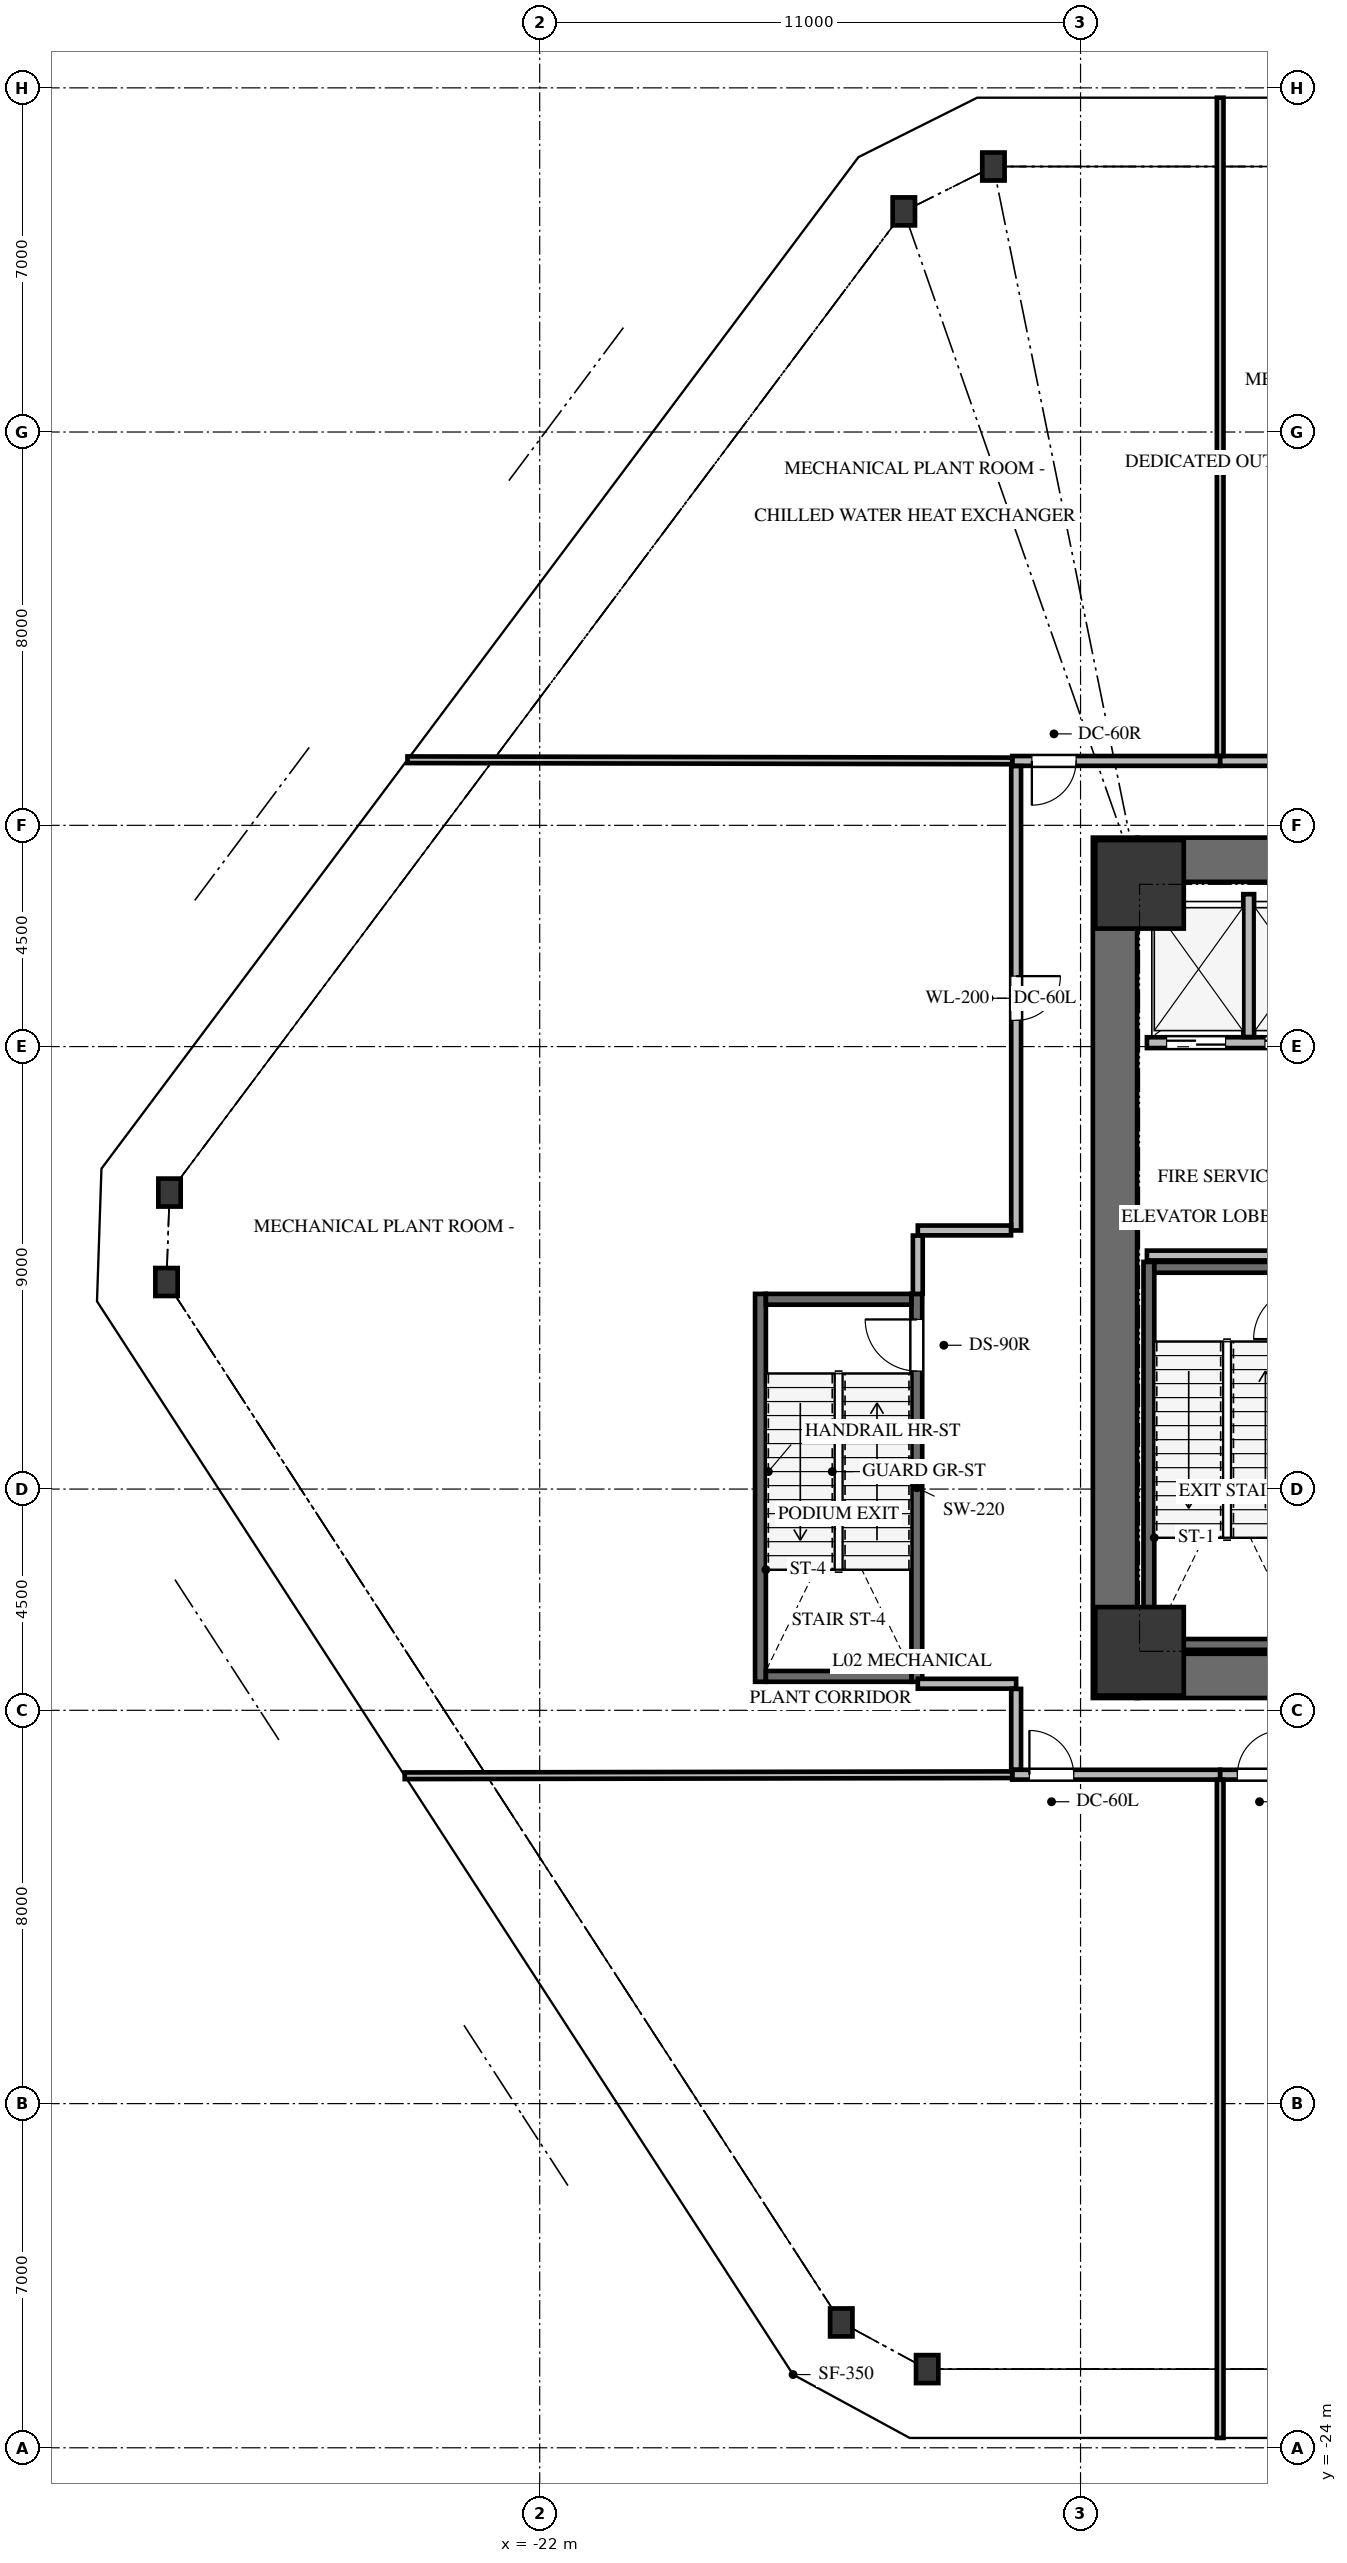
"""IFC4 building model, lengths in metres.
Left out: names, types, materials, properties, quantities, classifications, styles, units other than length and angle.
Written with IfcOpenShell. Run it as: python <this file> out.ifc"""

import sys

from ifc_helpers import new_model, si_unit, direction, frame, frame_2d, origin, origin_2d, place, context, subcontext, project, spatial, rectangle, i_section, extrude, source, transform, mapped, element, fill, save


model = new_model("IFC4")
c1 = context("Model", 3, precision=1e-05, world=origin(), true_north=direction((0.0, 1.0)))
c2 = subcontext(c1, "Body", "Model", "MODEL_VIEW")
j1 = project(units=[si_unit("LENGTHUNIT", "METRE"), si_unit("PLANEANGLEUNIT", "RADIAN")], contexts=[c1])
p1 = place(None, origin())
s1 = spatial("IfcSite", under=j1, at=p1, CompositionType="ELEMENT")
p2 = place(p1, origin())
s2 = spatial("IfcBuilding", under=s1, at=p2, CompositionType="ELEMENT")
p3 = place(p2, frame((0.0, 0.0, 10.4)))
s3 = spatial("IfcBuildingStorey", under=s2, at=p3, CompositionType="ELEMENT", Elevation=10.4)
p4 = place(p3, frame((-10.3, -8.75, 0.0), z_axis=(0.0, 0.0, 1.0), x_axis=(0.0, 1.0, 0.0)))
e1 = element("IfcWall", 1, at=p4, inside=s3, PredefinedType="SHEAR", context=c2, shape_type="SweptSolid", body=[
    extrude(rectangle(XDim=17.5, YDim=0.9, at=frame_2d((8.75, 0.0))), origin(), (0.0, 0.0, 1.0), 5.2),
])
p5 = place(p3, frame((-9.85, -8.3, 0.0), z_axis=(0.0, 0.0, 1.0), x_axis=(1.0, 0.0, 0.0)))
e2 = element("IfcWall", 2, at=p5, inside=s3, PredefinedType="SHEAR", context=c2, shape_type="SweptSolid", body=[
    extrude(rectangle(XDim=7.75, YDim=0.9, at=frame_2d((3.875, 0.0))), origin(), (0.0, 0.0, 1.0), 5.2),
])
p6 = place(p3, frame((-9.85, 8.3, 0.0), z_axis=(0.0, 0.0, 1.0), x_axis=(1.0, 0.0, 0.0)))
e3 = element("IfcWall", 3, at=p6, inside=s3, PredefinedType="SHEAR", context=c2, shape_type="SweptSolid", body=[
    extrude(rectangle(XDim=19.7, YDim=0.9, at=frame_2d((9.85, 0.0))), origin(), (0.0, 0.0, 1.0), 5.2),
])
p7 = place(p3, frame((-9.61, 0.12, -0.35), z_axis=(0.0, 0.0, 1.0), x_axis=(0.0, -1.0, 0.0)))
e4 = element("IfcWall", 4, at=p7, inside=s3, PredefinedType="SHEAR", context=c2, shape_type="SweptSolid", body=[
    extrude(rectangle(XDim=7.89, YDim=0.22, at=frame_2d((3.945, 0.0))), origin(), (0.0, 0.0, 1.0), 5.23),
])
for number, where, z_axis, x_axis in (
    (5, (-9.5, -7.66, -0.35), (0.0, 0.0, 1.0), (1.0, 0.0, 0.0)),
    (6, (-6.54, 0.01, -0.35), (0.0, 0.0, 1.0), (-1.0, 0.0, 0.0)),
):
    element("IfcWall", number, at=place(p3, frame(where, z_axis=z_axis, x_axis=x_axis)), inside=s3, PredefinedType="SHEAR", context=c2, shape_type="SweptSolid", body=[
        extrude(rectangle(XDim=2.96, YDim=0.22, at=frame_2d((1.48, 0.0))), origin(), (0.0, 0.0, 1.0), 5.23),
    ])
p8 = place(p3, frame((-14.33, -8.42, -0.35), z_axis=(0.0, 0.0, 1.0), x_axis=(0.0, 1.0, 0.0)))
e7 = element("IfcWall", 7, at=p8, inside=s3, PredefinedType="SHEAR", context=c2, shape_type="SweptSolid", body=[
    extrude(rectangle(XDim=7.89, YDim=0.22, at=frame_2d((3.945, 0.0))), origin(), (0.0, 0.0, 1.0), 5.23),
])
p9 = place(p8, frame((6.32, 0.0, 0.0)))
e8 = element("IfcOpeningElement", 8, at=p9, cuts=e7, PredefinedType="OPENING", context=c2, shape_type="SweptSolid", body=[
    extrude(rectangle(XDim=1.05, YDim=2.15, at=frame_2d((0.525, 1.075))), frame((0.0, 0.12, 0.0), z_axis=(0.0, -1.0, 0.0), x_axis=(1.0, 0.0, 0.0)), (0.0, 0.0, 1.0), 0.24),
])
p10 = place(p3, frame((-17.51, -0.53, -0.35), z_axis=(0.0, 0.0, 1.0), x_axis=(0.0, -1.0, 0.0)))
e9 = element("IfcWall", 9, at=p10, inside=s3, PredefinedType="SHEAR", context=c2, shape_type="SweptSolid", body=[
    extrude(rectangle(XDim=7.89, YDim=0.22, at=frame_2d((3.945, 0.0))), origin(), (0.0, 0.0, 1.0), 5.23),
])
for number, where, z_axis, x_axis in (
    (10, (-17.4, -8.31, -0.35), (0.0, 0.0, 1.0), (1.0, 0.0, 0.0)),
    (11, (-14.44, -0.64, -0.35), (0.0, 0.0, 1.0), (-1.0, 0.0, 0.0)),
):
    element("IfcWall", number, at=place(p3, frame(where, z_axis=z_axis, x_axis=x_axis)), inside=s3, PredefinedType="SHEAR", context=c2, shape_type="SweptSolid", body=[
        extrude(rectangle(XDim=2.96, YDim=0.22, at=frame_2d((1.48, 0.0))), origin(), (0.0, 0.0, 1.0), 5.23),
    ])
m1 = source(origin(), c2, "Body", "SweptSolid", [
    extrude(rectangle(XDim=1.8, YDim=1.8, at=origin_2d()), origin(), (0.0, 0.0, 1.0), 5.23),
])
for number, where, z_axis, x_axis in (
    (12, (-9.8, -7.8, -0.35), (0.0, 0.0, 1.0), (1.0, 0.0, 0.0)),
    (13, (-9.8, 7.8, -0.35), (0.0, 0.0, 1.0), (1.0, 0.0, 0.0)),
):
    element("IfcColumn", number, at=place(p3, frame(where, z_axis=z_axis, x_axis=x_axis)), inside=s3, PredefinedType="COLUMN", context=c2, shape_type="MappedRepresentation", body=[
        mapped(m1, transform((0.0, 0.0, 0.0), x_axis=(1.0, 0.0, 0.0), y_axis=(0.0, 1.0, 0.0), z_axis=(0.0, 0.0, 1.0), scale=1.0)),
    ])
m2 = source(origin(), c2, "Body", "SweptSolid", [
    extrude(i_section(OverallWidth=0.454, OverallDepth=0.569, WebThickness=0.078, FlangeThickness=0.125, FilletRadius=0.031, at=origin_2d()), origin(), (0.0, 0.0, 1.0), 5.23),
])
for number, where, z_axis, x_axis in (
    (14, (-15.866, -21.451, -0.35), (0.0, 0.0, 1.0), (1.0, 0.0, 0.0)),
    (15, (-29.591, -0.289, -0.35), (0.0, 0.0, 1.0), (1.0, 0.0, 0.0)),
    (16, (-29.529, 1.531, -0.35), (0.0, 0.0, 1.0), (1.0, 0.0, 0.0)),
    (17, (-14.594, 21.488, -0.35), (0.0, 0.0, 1.0), (1.0, 0.0, 0.0)),
    (18, (-12.772, 22.4, -0.35), (0.0, 0.0, 1.0), (1.0, 0.0, 0.0)),
    (19, (-14.119, -22.4, -0.35), (0.0, 0.0, 1.0), (1.0, 0.0, 0.0)),
):
    element("IfcColumn", number, at=place(p3, frame(where, z_axis=z_axis, x_axis=x_axis)), inside=s3, PredefinedType="COLUMN", context=c2, shape_type="MappedRepresentation", body=[
        mapped(m2, transform((0.0, 0.0, 0.0), x_axis=(1.0, 0.0, 0.0), y_axis=(0.0, 1.0, 0.0), z_axis=(0.0, 0.0, 1.0), scale=1.0)),
    ])
p11 = place(p3, frame((-9.65, 4.58, 0.0), z_axis=(0.0, 0.0, 1.0), x_axis=(1.0, 0.0, 0.0)))
e20 = element("IfcWall", 20, at=p11, inside=s3, PredefinedType="SOLIDWALL", context=c2, shape_type="SweptSolid", body=[
    extrude(rectangle(XDim=4.175, YDim=0.22, at=frame_2d((2.087, 0.0))), origin(), (0.0, 0.0, 1.0), 4.865),
])
p12 = place(p11, frame((0.4, 0.0, 0.0)))
e21 = element("IfcOpeningElement", 21, at=p12, cuts=e20, PredefinedType="OPENING", context=c2, shape_type="SweptSolid", body=[
    extrude(rectangle(XDim=1.2, YDim=2.15, at=frame_2d((0.6, 1.075))), frame((0.0, 0.12, 0.0), z_axis=(0.0, -1.0, 0.0), x_axis=(1.0, 0.0, 0.0)), (0.0, 0.0, 1.0), 0.24),
])
p13 = place(p11, frame((2.4, 0.0, 0.0)))
e22 = element("IfcOpeningElement", 22, at=p13, cuts=e20, PredefinedType="OPENING", context=c2, shape_type="SweptSolid", body=[
    extrude(rectangle(XDim=1.2, YDim=2.15, at=frame_2d((0.6, 1.075))), frame((0.0, 0.12, 0.0), z_axis=(0.0, -1.0, 0.0), x_axis=(1.0, 0.0, 0.0)), (0.0, 0.0, 1.0), 0.24),
])
p14 = place(p3, frame((-7.58, 4.694, 0.0), z_axis=(0.0, 0.0, 1.0), x_axis=(0.0, 1.0, 0.0)))
e23 = element("IfcWall", 23, at=p14, inside=s3, PredefinedType="SOLIDWALL", context=c2, shape_type="SweptSolid", body=[
    extrude(rectangle(XDim=2.906, YDim=0.22, at=frame_2d((1.453, 0.0))), origin(), (0.0, 0.0, 1.0), 4.865),
])
p15 = place(p3, frame((-9.65, 0.25, 0.0), z_axis=(0.0, 0.0, 1.0), x_axis=(1.0, 0.0, 0.0)))
e24 = element("IfcWall", 24, at=p15, inside=s3, PredefinedType="SOLIDWALL", context=c2, shape_type="SweptSolid", body=[
    extrude(rectangle(XDim=4.27, YDim=0.2, at=frame_2d((2.135, 0.0))), origin(), (0.0, 0.0, 1.0), 4.865),
])
p16 = place(p3, frame((-8.16, 10.31, 0.0), z_axis=(0.0, 0.0, 1.0), x_axis=(-1.0, 0.0, 0.0)))
e25 = element("IfcWall", 25, at=p16, inside=s3, PredefinedType="SOLIDWALL", context=c2, shape_type="SweptSolid", body=[
    extrude(rectangle(XDim=4.23, YDim=0.2, at=frame_2d((2.115, 0.0))), origin(), (0.0, 0.0, 1.0), 3.787),
])
p17 = place(p16, frame((2.93, 0.0, 0.0)))
e26 = element("IfcOpeningElement", 26, at=p17, cuts=e25, PredefinedType="OPENING", context=c2, shape_type="SweptSolid", body=[
    extrude(rectangle(XDim=0.9, YDim=2.05, at=frame_2d((0.45, 1.025))), frame((0.0, 0.11, 0.0), z_axis=(0.0, -1.0, 0.0), x_axis=(1.0, 0.0, 0.0)), (0.0, 0.0, 1.0), 0.22),
])
p18 = place(p3, frame((-2.66, 10.31, 0.0), z_axis=(0.0, 0.0, 1.0), x_axis=(-1.0, 0.0, 0.0)))
e27 = element("IfcWall", 27, at=p18, inside=s3, PredefinedType="SOLIDWALL", context=c2, shape_type="SweptSolid", body=[
    extrude(rectangle(XDim=5.5, YDim=0.2, at=frame_2d((2.75, 0.0))), origin(), (0.0, 0.0, 1.0), 4.418),
])
p19 = place(p18, frame((2.3, 0.0, 0.0)))
e28 = element("IfcOpeningElement", 28, at=p19, cuts=e27, PredefinedType="OPENING", context=c2, shape_type="SweptSolid", body=[
    extrude(rectangle(XDim=0.9, YDim=2.05, at=frame_2d((0.45, 1.025))), frame((0.0, 0.11, 0.0), z_axis=(0.0, -1.0, 0.0), x_axis=(1.0, 0.0, 0.0)), (0.0, 0.0, 1.0), 0.22),
])
p20 = place(p3, frame((-12.39, -10.31, 0.0), z_axis=(0.0, 0.0, 1.0), x_axis=(1.0, 0.0, 0.0)))
e29 = element("IfcWall", 29, at=p20, inside=s3, PredefinedType="SOLIDWALL", context=c2, shape_type="SweptSolid", body=[
    extrude(rectangle(XDim=4.23, YDim=0.2, at=frame_2d((2.115, 0.0))), origin(), (0.0, 0.0, 1.0), 3.787),
])
p21 = place(p20, frame((0.35, 0.0, 0.0)))
e30 = element("IfcOpeningElement", 30, at=p21, cuts=e29, PredefinedType="OPENING", context=c2, shape_type="SweptSolid", body=[
    extrude(rectangle(XDim=0.9, YDim=2.05, at=frame_2d((0.45, 1.025))), frame((0.0, 0.11, 0.0), z_axis=(0.0, -1.0, 0.0), x_axis=(1.0, 0.0, 0.0)), (0.0, 0.0, 1.0), 0.22),
])
p22 = place(p3, frame((-8.16, -10.31, 0.0), z_axis=(0.0, 0.0, 1.0), x_axis=(1.0, 0.0, 0.0)))
e31 = element("IfcWall", 31, at=p22, inside=s3, PredefinedType="SOLIDWALL", context=c2, shape_type="SweptSolid", body=[
    extrude(rectangle(XDim=5.5, YDim=0.2, at=frame_2d((2.75, 0.0))), origin(), (0.0, 0.0, 1.0), 3.787),
])
p23 = place(p22, frame((0.35, 0.0, 0.0)))
e32 = element("IfcOpeningElement", 32, at=p23, cuts=e31, PredefinedType="OPENING", context=c2, shape_type="SweptSolid", body=[
    extrude(rectangle(XDim=0.9, YDim=2.05, at=frame_2d((0.45, 1.025))), frame((0.0, 0.11, 0.0), z_axis=(0.0, -1.0, 0.0), x_axis=(1.0, 0.0, 0.0)), (0.0, 0.0, 1.0), 0.22),
])
p24 = place(p3, frame((-12.31, 10.206, 0.0), z_axis=(0.0, 0.0, 1.0), x_axis=(0.0, -1.0, 0.0)))
e33 = element("IfcWall", 33, at=p24, inside=s3, PredefinedType="SOLIDWALL", context=c2, shape_type="SweptSolid", body=[
    extrude(rectangle(XDim=9.446, YDim=0.2, at=frame_2d((4.723, 0.0))), origin(), (0.0, 0.0, 1.0), 3.787),
])
p25 = place(p24, frame((4.273, 0.0, 0.0)))
e34 = element("IfcOpeningElement", 34, at=p25, cuts=e33, PredefinedType="OPENING", context=c2, shape_type="SweptSolid", body=[
    extrude(rectangle(XDim=0.9, YDim=2.05, at=frame_2d((0.45, 1.025))), frame((0.0, 0.11, 0.0), z_axis=(0.0, -1.0, 0.0), x_axis=(1.0, 0.0, 0.0)), (0.0, 0.0, 1.0), 0.22),
])
p26 = place(p3, frame((-12.414, 0.76, 0.0), z_axis=(0.0, 0.0, 1.0), x_axis=(-1.0, 0.0, 0.0)))
e35 = element("IfcWall", 35, at=p26, inside=s3, PredefinedType="SOLIDWALL", context=c2, shape_type="SweptSolid", body=[
    extrude(rectangle(XDim=1.896, YDim=0.2, at=frame_2d((0.948, 0.0))), origin(), (0.0, 0.0, 1.0), 4.865),
])
p27 = place(p3, frame((-14.31, -8.46, 0.0), z_axis=(0.0, 0.0, 1.0), x_axis=(1.0, 0.0, 0.0)))
e36 = element("IfcWall", 36, at=p27, inside=s3, PredefinedType="SOLIDWALL", context=c2, shape_type="SweptSolid", body=[
    extrude(rectangle(XDim=2.0, YDim=0.2, at=frame_2d((1.0, 0.0))), origin(), (0.0, 0.0, 1.0), 4.865),
])
p28 = place(p3, frame((-12.31, -8.564, 0.0), z_axis=(0.0, 0.0, 1.0), x_axis=(0.0, -1.0, 0.0)))
e37 = element("IfcWall", 37, at=p28, inside=s3, PredefinedType="SOLIDWALL", context=c2, shape_type="SweptSolid", body=[
    extrude(rectangle(XDim=1.642, YDim=0.2, at=frame_2d((0.821, 0.0))), origin(), (0.0, 0.0, 1.0), 3.787),
])
p29 = place(p3, frame((-14.31, 0.656, 0.0), z_axis=(0.0, 0.0, 1.0), x_axis=(0.0, -1.0, 0.0)))
e38 = element("IfcWall", 38, at=p29, inside=s3, PredefinedType="SOLIDWALL", context=c2, shape_type="SweptSolid", body=[
    extrude(rectangle(XDim=1.186, YDim=0.2, at=frame_2d((0.593, 0.0))), origin(), (0.0, 0.0, 1.0), 4.865),
])
p30 = place(p3, frame((-8.16, 23.8, 0.0), z_axis=(0.0, 0.0, 1.0), x_axis=(0.0, -1.0, 0.0)))
e39 = element("IfcWall", 39, at=p30, inside=s3, PredefinedType="PARTITIONING", context=c2, shape_type="SweptSolid", body=[
    extrude(rectangle(XDim=13.386, YDim=0.135, at=frame_2d((6.693, 0.0))), origin(), (0.0, 0.0, 1.0), 4.174),
])
p31 = place(p3, frame((-12.39, 10.31, 0.0), z_axis=(0.0, 0.0, 1.0), x_axis=(-0.999998146559, 0.001925325425, 0.0)))
e40 = element("IfcWall", 40, at=p31, inside=s3, PredefinedType="PARTITIONING", context=c2, shape_type="SweptSolid", body=[
    extrude(rectangle(XDim=12.3, YDim=0.135, at=frame_2d((6.15, 0.0))), origin(), (0.0, 0.0, 1.0), 4.174),
])
p32 = place(p3, frame((-8.16, -10.414, 0.0), z_axis=(0.0, 0.0, 1.0), x_axis=(0.0, -1.0, 0.0)))
e41 = element("IfcWall", 41, at=p32, inside=s3, PredefinedType="PARTITIONING", context=c2, shape_type="SweptSolid", body=[
    extrude(rectangle(XDim=13.386, YDim=0.135, at=frame_2d((6.693, 0.0))), origin(), (0.0, 0.0, 1.0), 3.787),
])
p33 = place(p3, frame((-24.746, -10.332, 0.0), z_axis=(0.0, 0.0, 1.0), x_axis=(0.999998453823, 0.001758508277, 0.0)))
e42 = element("IfcWall", 42, at=p33, inside=s3, PredefinedType="PARTITIONING", context=c2, shape_type="SweptSolid", body=[
    extrude(rectangle(XDim=12.356, YDim=0.135, at=frame_2d((6.178, 0.0))), origin(), (0.0, 0.0, 1.0), 3.787),
])
m3 = source(origin(), c2, "Body", "SweptSolid", [
    extrude(rectangle(XDim=1.05, YDim=2.15, at=frame_2d((0.525, 1.075))), frame((0.0, 0.025, 0.0), z_axis=(0.0, -1.0, 0.0), x_axis=(1.0, 0.0, 0.0)), (0.0, 0.0, 1.0), 0.05),
])
p34 = place(p9, origin())
e43 = element("IfcDoor", 43, at=p34, inside=s3, OperationType="SINGLE_SWING_RIGHT", PredefinedType="DOOR", context=c2, shape_type="MappedRepresentation", body=[
    mapped(m3, transform((0.0, 0.0, 0.0), x_axis=(1.0, 0.0, 0.0), y_axis=(0.0, 1.0, 0.0), z_axis=(0.0, 0.0, 1.0), scale=1.0)),
])
fill(e8, e43)
m4 = source(origin(), c2, "Body", "SweptSolid", [
    extrude(rectangle(XDim=1.2, YDim=2.15, at=frame_2d((0.6, 1.075))), frame((0.0, 0.025, 0.0), z_axis=(0.0, -1.0, 0.0), x_axis=(1.0, 0.0, 0.0)), (0.0, 0.0, 1.0), 0.05),
])
p35 = place(p12, origin())
e44 = element("IfcDoor", 44, at=p35, inside=s3, OperationType="DOUBLE_DOOR_SLIDING", PredefinedType="DOOR", context=c2, shape_type="MappedRepresentation", body=[
    mapped(m4, transform((0.0, 0.0, 0.0), x_axis=(1.0, 0.0, 0.0), y_axis=(0.0, 1.0, 0.0), z_axis=(0.0, 0.0, 1.0), scale=1.0)),
])
fill(e21, e44)
p36 = place(p13, origin())
e45 = element("IfcDoor", 45, at=p36, inside=s3, OperationType="DOUBLE_DOOR_SLIDING", PredefinedType="DOOR", context=c2, shape_type="MappedRepresentation", body=[
    mapped(m4, transform((0.0, 0.0, 0.0), x_axis=(1.0, 0.0, 0.0), y_axis=(0.0, 1.0, 0.0), z_axis=(0.0, 0.0, 1.0), scale=1.0)),
])
fill(e22, e45)
m5 = source(origin(), c2, "Body", "SweptSolid", [
    extrude(rectangle(XDim=0.9, YDim=2.05, at=frame_2d((0.45, 1.025))), frame((0.0, 0.025, 0.0), z_axis=(0.0, -1.0, 0.0), x_axis=(1.0, 0.0, 0.0)), (0.0, 0.0, 1.0), 0.05),
])
p37 = place(p17, origin())
e46 = element("IfcDoor", 46, at=p37, inside=s3, OperationType="SINGLE_SWING_RIGHT", PredefinedType="DOOR", context=c2, shape_type="MappedRepresentation", body=[
    mapped(m5, transform((0.0, 0.0, 0.0), x_axis=(1.0, 0.0, 0.0), y_axis=(0.0, 1.0, 0.0), z_axis=(0.0, 0.0, 1.0), scale=1.0)),
])
fill(e26, e46)
m6 = source(origin(), c2, "Body", "SweptSolid", [
    extrude(rectangle(XDim=0.9, YDim=2.05, at=frame_2d((0.45, 1.025))), frame((0.0, 0.025, 0.0), z_axis=(0.0, -1.0, 0.0), x_axis=(1.0, 0.0, 0.0)), (0.0, 0.0, 1.0), 0.05),
])
p38 = place(p21, origin())
e47 = element("IfcDoor", 47, at=p38, inside=s3, OperationType="SINGLE_SWING_LEFT", PredefinedType="DOOR", context=c2, shape_type="MappedRepresentation", body=[
    mapped(m6, transform((0.0, 0.0, 0.0), x_axis=(1.0, 0.0, 0.0), y_axis=(0.0, 1.0, 0.0), z_axis=(0.0, 0.0, 1.0), scale=1.0)),
])
fill(e30, e47)
p39 = place(p23, origin())
e48 = element("IfcDoor", 48, at=p39, inside=s3, OperationType="SINGLE_SWING_RIGHT", PredefinedType="DOOR", context=c2, shape_type="MappedRepresentation", body=[
    mapped(m5, transform((0.0, 0.0, 0.0), x_axis=(1.0, 0.0, 0.0), y_axis=(0.0, 1.0, 0.0), z_axis=(0.0, 0.0, 1.0), scale=1.0)),
])
fill(e32, e48)
p40 = place(p25, origin())
e49 = element("IfcDoor", 49, at=p40, inside=s3, OperationType="SINGLE_SWING_LEFT", PredefinedType="DOOR", context=c2, shape_type="MappedRepresentation", body=[
    mapped(m6, transform((0.0, 0.0, 0.0), x_axis=(1.0, 0.0, 0.0), y_axis=(0.0, 1.0, 0.0), z_axis=(0.0, 0.0, 1.0), scale=1.0)),
])
fill(e34, e49)
save(model, sys.argv[1])
